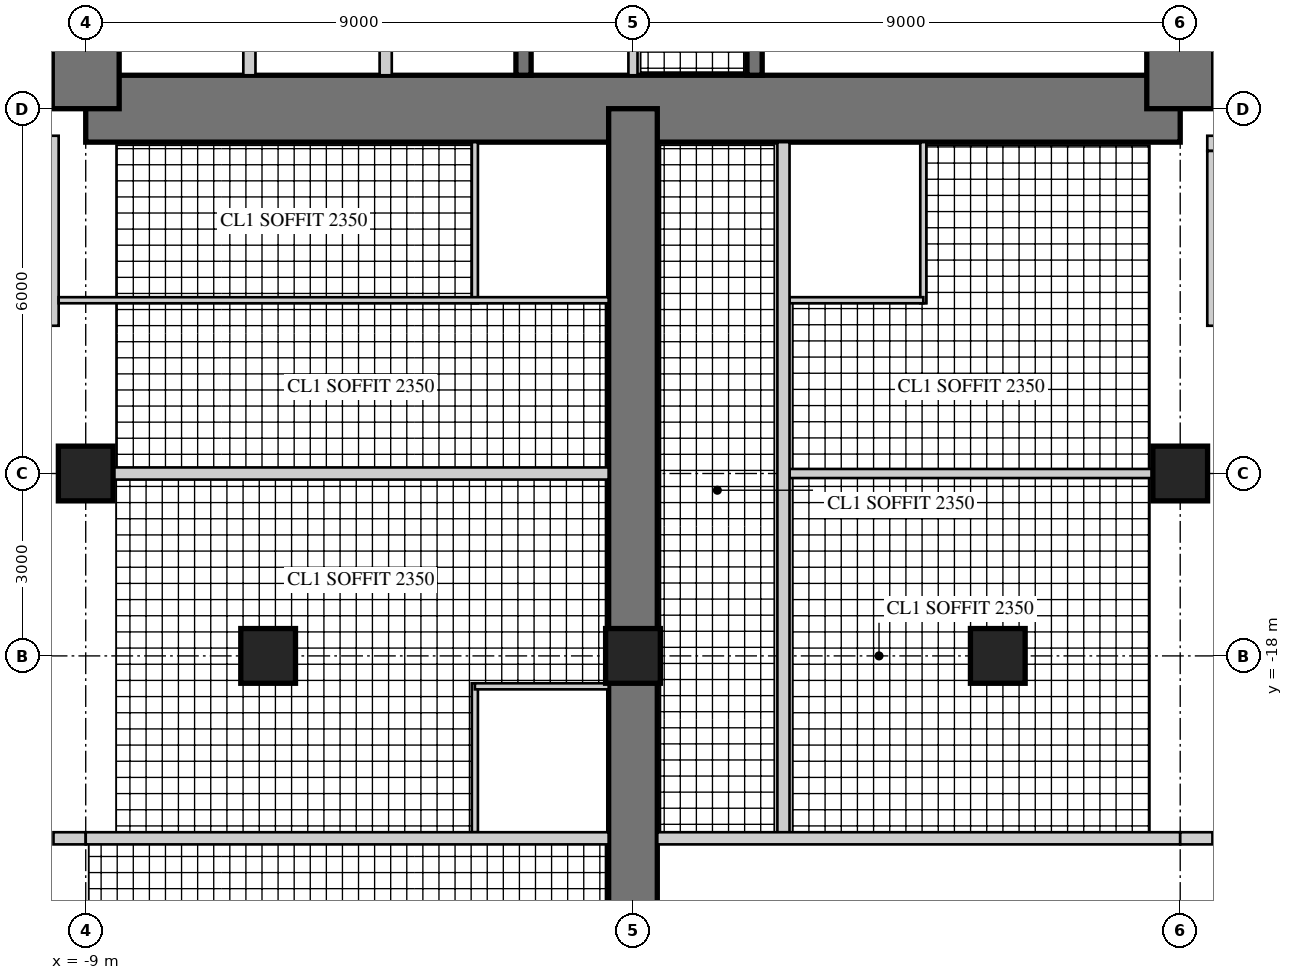
"""IFC4 building model, lengths in metres.
Left out: names, types, materials, properties, quantities, classifications, styles, units other than length and angle.
Written with IfcOpenShell. Run it as: python <this file> out.ifc"""

import sys

from ifc_helpers import new_model, si_unit, direction, frame, frame_2d, origin, origin_2d, place, context, subcontext, project, spatial, rectangle, hollow_rectangle, extrude, element, fill, save


model = new_model("IFC4")
c1 = context("Model", 3, precision=1e-05, world=origin(), true_north=direction((0.0, 1.0)))
c2 = subcontext(c1, "Body", "Model", "MODEL_VIEW")
j1 = project(units=[si_unit("LENGTHUNIT", "METRE"), si_unit("PLANEANGLEUNIT", "RADIAN")], contexts=[c1])
p1 = place(None, origin())
s1 = spatial("IfcSite", under=j1, at=p1, CompositionType="ELEMENT")
p2 = place(p1, origin())
s2 = spatial("IfcBuilding", under=s1, at=p2, CompositionType="ELEMENT")
p3 = place(p2, frame((0.0, 0.0, 179.7)))
s3 = spatial("IfcBuildingStorey", under=s2, at=p3, CompositionType="ELEMENT", Elevation=179.7)
p4 = place(p3, frame((-9.0, -9.0, 0.0), z_axis=(0.0, 0.0, 1.0), x_axis=(1.0, 0.0, 0.0)))
e1 = element("IfcWall", 1, at=p4, inside=s3, PredefinedType="SHEAR", context=c2, shape_type="SweptSolid", body=[
    extrude(rectangle(XDim=18.0, YDim=1.1, at=frame_2d((9.0, 0.0))), origin(), (0.0, 0.0, 1.0), 3.4),
])
p5 = place(p4, frame((9.8, 0.0, 0.0)))
e2 = element("IfcOpeningElement", 2, at=p5, cuts=e1, PredefinedType="OPENING", context=c2, shape_type="SweptSolid", body=[
    extrude(rectangle(XDim=1.0, YDim=2.4, at=frame_2d((0.5, 1.2))), frame((0.0, 0.56, 0.0), z_axis=(0.0, -1.0, 0.0), x_axis=(1.0, 0.0, 0.0)), (0.0, 0.0, 1.0), 1.12),
])
p6 = place(p3, frame((9.0, -9.0, 0.0), z_axis=(0.0, 0.0, 1.0), x_axis=(0.0, 1.0, 0.0)))
e3 = element("IfcWall", 3, at=p6, inside=s3, PredefinedType="SHEAR", context=c2, shape_type="SweptSolid", body=[
    extrude(rectangle(XDim=18.0, YDim=1.1, at=frame_2d((9.0, 0.0))), origin(), (0.0, 0.0, 1.0), 3.4),
])
p7 = place(p6, frame((9.8, 0.0, 0.0)))
e4 = element("IfcOpeningElement", 4, at=p7, cuts=e3, PredefinedType="OPENING", context=c2, shape_type="SweptSolid", body=[
    extrude(rectangle(XDim=1.0, YDim=2.4, at=frame_2d((0.5, 1.2))), frame((0.0, 0.56, 0.0), z_axis=(0.0, -1.0, 0.0), x_axis=(1.0, 0.0, 0.0)), (0.0, 0.0, 1.0), 1.12),
])
p8 = place(p3, frame((-9.0, 9.0, 0.0), z_axis=(0.0, 0.0, 1.0), x_axis=(0.0, -1.0, 0.0)))
e5 = element("IfcWall", 5, at=p8, inside=s3, PredefinedType="SHEAR", context=c2, shape_type="SweptSolid", body=[
    extrude(rectangle(XDim=18.0, YDim=1.1, at=frame_2d((9.0, 0.0))), origin(), (0.0, 0.0, 1.0), 3.4),
])
p9 = place(p8, frame((9.8, 0.0, 0.0)))
e6 = element("IfcOpeningElement", 6, at=p9, cuts=e5, PredefinedType="OPENING", context=c2, shape_type="SweptSolid", body=[
    extrude(rectangle(XDim=1.0, YDim=2.4, at=frame_2d((0.5, 1.2))), frame((0.0, 0.56, 0.0), z_axis=(0.0, -1.0, 0.0), x_axis=(1.0, 0.0, 0.0)), (0.0, 0.0, 1.0), 1.12),
])
p10 = place(p3, frame((-1.8, -1.875, 0.0), z_axis=(0.0, 0.0, 1.0), x_axis=(0.0, -1.0, 0.0)))
e7 = element("IfcWall", 7, at=p10, inside=s3, PredefinedType="SHEAR", context=c2, shape_type="SweptSolid", body=[
    extrude(rectangle(XDim=6.575, YDim=0.25, at=frame_2d((3.288, 0.0))), origin(), (0.0, 0.0, 1.0), 3.4),
])
p11 = place(p10, frame((1.875, 0.0, 0.0)))
e8 = element("IfcOpeningElement", 8, at=p11, cuts=e7, PredefinedType="OPENING", context=c2, shape_type="SweptSolid", body=[
    extrude(rectangle(XDim=1.6, YDim=2.4, at=frame_2d((0.8, 1.2))), frame((0.0, 0.135, 0.0), z_axis=(0.0, -1.0, 0.0), x_axis=(1.0, 0.0, 0.0)), (0.0, 0.0, 1.0), 0.27),
])
for number, where, z_axis, x_axis in (
    (9, (-4.067, -5.975, 0.0), (0.0, 0.0, 1.0), (0.0, -1.0, 0.0)),
    (10, (-6.308, -5.975, 0.0), (0.0, 0.0, 1.0), (0.0, -1.0, 0.0)),
):
    element("IfcWall", number, at=place(p3, frame(where, z_axis=z_axis, x_axis=x_axis)), inside=s3, PredefinedType="PARTITIONING", context=c2, shape_type="SweptSolid", body=[
        extrude(rectangle(XDim=2.475, YDim=0.2, at=frame_2d((1.237, 0.0))), origin(), (0.0, 0.0, 1.0), 3.4),
    ])
p12 = place(p3, frame((2.0, -1.675, 0.0), z_axis=(0.0, 0.0, 1.0), x_axis=(0.0, -1.0, 0.0)))
e11 = element("IfcWall", 11, at=p12, inside=s3, PredefinedType="SHEAR", context=c2, shape_type="SweptSolid", body=[
    extrude(rectangle(XDim=6.775, YDim=0.25, at=frame_2d((3.387, 0.0))), origin(), (0.0, 0.0, 1.0), 3.4),
])
p13 = place(p12, frame((0.725, 0.0, 0.0)))
e12 = element("IfcOpeningElement", 12, at=p13, cuts=e11, PredefinedType="OPENING", context=c2, shape_type="SweptSolid", body=[
    extrude(rectangle(XDim=1.0, YDim=2.1, at=frame_2d((0.5, 1.05))), frame((0.0, 0.135, 0.0), z_axis=(0.0, -1.0, 0.0), x_axis=(1.0, 0.0, 0.0)), (0.0, 0.0, 1.0), 0.27),
])
p14 = place(p3, frame((0.0, -9.0, 0.0), z_axis=(0.0, 0.0, 1.0), x_axis=(0.0, -1.0, 0.0)))
e13 = element("IfcWall", 13, at=p14, inside=s3, PredefinedType="SHEAR", context=c2, shape_type="SweptSolid", body=[
    extrude(rectangle(XDim=18.0, YDim=0.8, at=frame_2d((9.0, 0.0))), origin(), (0.0, 0.0, 1.0), 3.4),
])
p15 = place(p14, frame((3.95, 0.0, 0.0)))
e14 = element("IfcOpeningElement", 14, at=p15, cuts=e13, PredefinedType="OPENING", context=c2, shape_type="SweptSolid", body=[
    extrude(rectangle(XDim=1.0, YDim=2.15, at=frame_2d((0.5, 1.075))), frame((0.0, 0.41, 0.0), z_axis=(0.0, -1.0, 0.0), x_axis=(1.0, 0.0, 0.0)), (0.0, 0.0, 1.0), 0.82),
])
p16 = place(p14, frame((6.6, 0.0, 0.0)))
e15 = element("IfcOpeningElement", 15, at=p16, cuts=e13, PredefinedType="OPENING", context=c2, shape_type="SweptSolid", body=[
    extrude(rectangle(XDim=1.0, YDim=2.15, at=frame_2d((0.5, 1.075))), frame((0.0, 0.41, 0.0), z_axis=(0.0, -1.0, 0.0), x_axis=(1.0, 0.0, 0.0)), (0.0, 0.0, 1.0), 0.82),
])
p17 = place(p14, frame((13.25, 0.0, 0.0)))
e16 = element("IfcOpeningElement", 16, at=p17, cuts=e13, PredefinedType="OPENING", context=c2, shape_type="SweptSolid", body=[
    extrude(rectangle(XDim=1.0, YDim=2.2, at=frame_2d((0.5, 1.1))), frame((0.0, 0.41, 0.0), z_axis=(0.0, -1.0, 0.0), x_axis=(1.0, 0.0, 0.0)), (0.0, 0.0, 1.0), 0.82),
])
for number, where, z_axis, x_axis in (
    (17, (-9.0, -15.0, 0.0), (0.0, 0.0, 1.0), (1.0, 0.0, 0.0)),
    (18, (9.0, -15.0, 0.0), (0.0, 0.0, 1.0), (1.0, 0.0, 0.0)),
    (19, (-6.0, -18.0, 0.0), (0.0, 0.0, 1.0), (1.0, 0.0, 0.0)),
    (20, (0.0, -18.0, 0.0), (0.0, 0.0, 1.0), (1.0, 0.0, 0.0)),
    (21, (6.0, -18.0, 0.0), (0.0, 0.0, 1.0), (1.0, 0.0, 0.0)),
):
    element("IfcColumn", number, at=place(p3, frame(where, z_axis=z_axis, x_axis=x_axis)), inside=s3, PredefinedType="COLUMN", context=c2, shape_type="SweptSolid", body=[
        extrude(rectangle(XDim=0.9, YDim=0.9, at=origin_2d()), origin(), (0.0, 0.0, 1.0), 3.4),
    ])
p18 = place(p3, frame((9.445, -9.57, 0.0), z_axis=(0.0, 0.0, 1.0), x_axis=(1.0, 0.0, 0.0)))
e22 = element("IfcWall", 22, at=p18, inside=s3, PredefinedType="SOLIDWALL", context=c2, shape_type="SweptSolid", body=[
    extrude(rectangle(XDim=3.125, YDim=0.25, at=frame_2d((1.562, 0.0))), origin(), (0.0, 0.0, 1.0), 3.22),
])
p19 = place(p18, frame((0.6, 0.0, 0.0)))
e23 = element("IfcOpeningElement", 23, at=p19, cuts=e22, PredefinedType="OPENING", context=c2, shape_type="SweptSolid", body=[
    extrude(rectangle(XDim=1.0, YDim=2.2, at=frame_2d((0.5, 1.1))), frame((0.0, 0.135, 0.0), z_axis=(0.0, -1.0, 0.0), x_axis=(1.0, 0.0, 0.0)), (0.0, 0.0, 1.0), 0.27),
])
p20 = place(p3, frame((-9.57, -9.445, 0.0), z_axis=(0.0, 0.0, 1.0), x_axis=(0.0, -1.0, 0.0)))
e24 = element("IfcWall", 24, at=p20, inside=s3, PredefinedType="SOLIDWALL", context=c2, shape_type="SweptSolid", body=[
    extrude(rectangle(XDim=3.125, YDim=0.25, at=frame_2d((1.562, 0.0))), origin(), (0.0, 0.0, 1.0), 3.22),
])
p21 = place(p20, frame((0.6, 0.0, 0.0)))
e25 = element("IfcOpeningElement", 25, at=p21, cuts=e24, PredefinedType="OPENING", context=c2, shape_type="SweptSolid", body=[
    extrude(rectangle(XDim=1.0, YDim=2.2, at=frame_2d((0.5, 1.1))), frame((0.0, 0.135, 0.0), z_axis=(0.0, -1.0, 0.0), x_axis=(1.0, 0.0, 0.0)), (0.0, 0.0, 1.0), 0.27),
])
p22 = place(p3, frame((9.57, -12.57, 0.0), z_axis=(0.0, 0.0, 1.0), x_axis=(0.0, 1.0, 0.0)))
e26 = element("IfcWall", 26, at=p22, inside=s3, PredefinedType="SOLIDWALL", context=c2, shape_type="SweptSolid", body=[
    extrude(rectangle(XDim=2.875, YDim=0.25, at=frame_2d((1.438, 0.0))), origin(), (0.0, 0.0, 1.0), 3.22),
])
p23 = place(p22, frame((0.6, 0.0, 0.0)))
e27 = element("IfcOpeningElement", 27, at=p23, cuts=e26, PredefinedType="OPENING", context=c2, shape_type="SweptSolid", body=[
    extrude(rectangle(XDim=1.0, YDim=2.2, at=frame_2d((0.5, 1.1))), frame((0.0, 0.135, 0.0), z_axis=(0.0, -1.0, 0.0), x_axis=(1.0, 0.0, 0.0)), (0.0, 0.0, 1.0), 0.27),
])
p24 = place(p3, frame((0.0, -5.675, 0.0), z_axis=(0.0, 0.0, 1.0), x_axis=(0.0, -1.0, 0.0)))
e28 = element("IfcWall", 28, at=p24, inside=s3, PredefinedType="PARTITIONING", context=c2, shape_type="SweptSolid", body=[
    extrude(rectangle(XDim=2.775, YDim=0.15, at=frame_2d((1.387, 0.0))), origin(), (0.0, 0.0, 1.0), 3.22),
])
p25 = place(p24, frame((0.4, 0.0, 0.0)))
e29 = element("IfcOpeningElement", 29, at=p25, cuts=e28, PredefinedType="OPENING", context=c2, shape_type="SweptSolid", body=[
    extrude(rectangle(XDim=1.0, YDim=2.1, at=frame_2d((0.5, 1.05))), frame((0.0, 0.085, 0.0), z_axis=(0.0, -1.0, 0.0), x_axis=(1.0, 0.0, 0.0)), (0.0, 0.0, 1.0), 0.17),
])
p26 = place(p3, frame((4.775, -9.55, 0.0), z_axis=(0.0, 0.0, 1.0), x_axis=(0.0, -1.0, 0.0)))
e30 = element("IfcWall", 30, at=p26, inside=s3, PredefinedType="PARTITIONING", context=c2, shape_type="SweptSolid", body=[
    extrude(rectangle(XDim=2.65, YDim=0.1, at=frame_2d((1.325, 0.0))), origin(), (0.0, 0.0, 1.0), 3.22),
])
p27 = place(p3, frame((2.575, -12.15, 0.0), z_axis=(0.0, 0.0, 1.0), x_axis=(1.0, 0.0, 0.0)))
e31 = element("IfcWall", 31, at=p27, inside=s3, PredefinedType="PARTITIONING", context=c2, shape_type="SweptSolid", body=[
    extrude(rectangle(XDim=2.2, YDim=0.1, at=frame_2d((1.1, 0.0))), origin(), (0.0, 0.0, 1.0), 3.22),
])
p28 = place(p27, frame((0.55, 0.0, 0.0)))
e32 = element("IfcOpeningElement", 32, at=p28, cuts=e31, PredefinedType="OPENING", context=c2, shape_type="SweptSolid", body=[
    extrude(rectangle(XDim=0.9, YDim=2.1, at=frame_2d((0.45, 1.05))), frame((0.0, 0.06, 0.0), z_axis=(0.0, -1.0, 0.0), x_axis=(1.0, 0.0, 0.0)), (0.0, 0.0, 1.0), 0.12),
])
p29 = place(p3, frame((2.575, -15.0, 0.0), z_axis=(0.0, 0.0, 1.0), x_axis=(1.0, 0.0, 0.0)))
e33 = element("IfcWall", 33, at=p29, inside=s3, PredefinedType="PARTITIONING", context=c2, shape_type="SweptSolid", body=[
    extrude(rectangle(XDim=5.975, YDim=0.15, at=frame_2d((2.988, 0.0))), origin(), (0.0, 0.0, 1.0), 2.47),
])
p30 = place(p29, frame((0.5, 0.0, 0.0)))
e34 = element("IfcOpeningElement", 34, at=p30, cuts=e33, PredefinedType="OPENING", context=c2, shape_type="SweptSolid", body=[
    extrude(rectangle(XDim=1.0, YDim=2.1, at=frame_2d((0.5, 1.05))), frame((0.0, 0.085, 0.0), z_axis=(0.0, -1.0, 0.0), x_axis=(1.0, 0.0, 0.0)), (0.0, 0.0, 1.0), 0.17),
])
p31 = place(p3, frame((-2.6, -9.55, 0.0), z_axis=(0.0, 0.0, 1.0), x_axis=(0.0, -1.0, 0.0)))
e35 = element("IfcWall", 35, at=p31, inside=s3, PredefinedType="PARTITIONING", context=c2, shape_type="SweptSolid", body=[
    extrude(rectangle(XDim=2.65, YDim=0.1, at=frame_2d((1.325, 0.0))), origin(), (0.0, 0.0, 1.0), 3.22),
])
p32 = place(p3, frame((-9.445, -12.15, 0.0), z_axis=(0.0, 0.0, 1.0), x_axis=(1.0, 0.0, 0.0)))
e36 = element("IfcWall", 36, at=p32, inside=s3, PredefinedType="PARTITIONING", context=c2, shape_type="SweptSolid", body=[
    extrude(rectangle(XDim=9.045, YDim=0.1, at=frame_2d((4.522, 0.0))), origin(), (0.0, 0.0, 1.0), 3.22),
])
p33 = place(p32, frame((5.495, 0.0, 0.0)))
e37 = element("IfcOpeningElement", 37, at=p33, cuts=e36, PredefinedType="OPENING", context=c2, shape_type="SweptSolid", body=[
    extrude(rectangle(XDim=0.9, YDim=2.1, at=frame_2d((0.45, 1.05))), frame((0.0, 0.06, 0.0), z_axis=(0.0, -1.0, 0.0), x_axis=(1.0, 0.0, 0.0)), (0.0, 0.0, 1.0), 0.12),
])
p34 = place(p32, frame((7.595, 0.0, 0.0)))
e38 = element("IfcOpeningElement", 38, at=p34, cuts=e36, PredefinedType="OPENING", context=c2, shape_type="SweptSolid", body=[
    extrude(rectangle(XDim=0.9, YDim=2.1, at=frame_2d((0.45, 1.05))), frame((0.0, 0.06, 0.0), z_axis=(0.0, -1.0, 0.0), x_axis=(1.0, 0.0, 0.0)), (0.0, 0.0, 1.0), 0.12),
])
p35 = place(p3, frame((-8.55, -15.0, 0.0), z_axis=(0.0, 0.0, 1.0), x_axis=(1.0, 0.0, 0.0)))
e39 = element("IfcWall", 39, at=p35, inside=s3, PredefinedType="SOLIDWALL", context=c2, shape_type="SweptSolid", body=[
    extrude(rectangle(XDim=8.15, YDim=0.2, at=frame_2d((4.075, 0.0))), origin(), (0.0, 0.0, 1.0), 2.47),
])
p36 = place(p3, frame((-2.6, -18.45, 0.0), z_axis=(0.0, 0.0, 1.0), x_axis=(0.0, -1.0, 0.0)))
e40 = element("IfcWall", 40, at=p36, inside=s3, PredefinedType="PARTITIONING", context=c2, shape_type="SweptSolid", body=[
    extrude(rectangle(XDim=2.45, YDim=0.1, at=frame_2d((1.225, 0.0))), origin(), (0.0, 0.0, 1.0), 3.22),
])
p37 = place(p3, frame((-2.6, -18.5, 0.0), z_axis=(0.0, 0.0, 1.0), x_axis=(1.0, 0.0, 0.0)))
e41 = element("IfcWall", 41, at=p37, inside=s3, PredefinedType="PARTITIONING", context=c2, shape_type="SweptSolid", body=[
    extrude(rectangle(XDim=2.2, YDim=0.1, at=frame_2d((1.1, 0.0))), origin(), (0.0, 0.0, 1.0), 3.22),
])
p38 = place(p37, frame((0.55, 0.0, 0.0)))
e42 = element("IfcOpeningElement", 42, at=p38, cuts=e41, PredefinedType="OPENING", context=c2, shape_type="SweptSolid", body=[
    extrude(rectangle(XDim=0.9, YDim=2.1, at=frame_2d((0.45, 1.05))), frame((0.0, 0.06, 0.0), z_axis=(0.0, -1.0, 0.0), x_axis=(1.0, 0.0, 0.0)), (0.0, 0.0, 1.0), 0.12),
])
p39 = place(p3, frame((2.475, -9.55, 0.0), z_axis=(0.0, 0.0, 1.0), x_axis=(0.0, -1.0, 0.0)))
e43 = element("IfcWall", 43, at=p39, inside=s3, PredefinedType="SOLIDWALL", context=c2, shape_type="SweptSolid", body=[
    extrude(rectangle(XDim=11.45, YDim=0.2, at=frame_2d((5.725, 0.0))), origin(), (0.0, 0.0, 1.0), 3.22),
])
p40 = place(p39, frame((3.4, 0.0, 0.0)))
e44 = element("IfcOpeningElement", 44, at=p40, cuts=e43, PredefinedType="OPENING", context=c2, shape_type="SweptSolid", body=[
    extrude(rectangle(XDim=1.0, YDim=2.15, at=frame_2d((0.5, 1.075))), frame((0.0, 0.11, 0.0), z_axis=(0.0, -1.0, 0.0), x_axis=(1.0, 0.0, 0.0)), (0.0, 0.0, 1.0), 0.22),
])
p41 = place(p3, frame((-9.53, -21.0, 0.0), z_axis=(0.0, 0.0, 1.0), x_axis=(1.0, 0.0, 0.0)))
e45 = element("IfcWall", 45, at=p41, inside=s3, PredefinedType="SOLIDWALL", context=c2, shape_type="SweptSolid", body=[
    extrude(rectangle(XDim=0.53, YDim=0.2, at=frame_2d((0.265, 0.0))), origin(), (0.0, 0.0, 1.0), 3.22),
])
p42 = place(p3, frame((-9.0, -21.0, 0.0), z_axis=(0.0, 0.0, 1.0), x_axis=(1.0, 0.0, 0.0)))
e46 = element("IfcWall", 46, at=p42, inside=s3, PredefinedType="SOLIDWALL", context=c2, shape_type="SweptSolid", body=[
    extrude(rectangle(XDim=8.6, YDim=0.2, at=frame_2d((4.3, 0.0))), origin(), (0.0, 0.0, 1.0), 2.62),
])
p43 = place(p3, frame((0.4, -21.0, 0.0), z_axis=(0.0, 0.0, 1.0), x_axis=(1.0, 0.0, 0.0)))
e47 = element("IfcWall", 47, at=p43, inside=s3, PredefinedType="SOLIDWALL", context=c2, shape_type="SweptSolid", body=[
    extrude(rectangle(XDim=8.6, YDim=0.2, at=frame_2d((4.3, 0.0))), origin(), (0.0, 0.0, 1.0), 2.62),
])
p44 = place(p43, frame((0.4, 0.0, 0.0)))
e48 = element("IfcOpeningElement", 48, at=p44, cuts=e47, PredefinedType="OPENING", context=c2, shape_type="SweptSolid", body=[
    extrude(rectangle(XDim=1.0, YDim=2.2, at=frame_2d((0.5, 1.1))), frame((0.0, 0.11, 0.0), z_axis=(0.0, -1.0, 0.0), x_axis=(1.0, 0.0, 0.0)), (0.0, 0.0, 1.0), 0.22),
])
p45 = place(p3, frame((9.0, -21.0, 0.0), z_axis=(0.0, 0.0, 1.0), x_axis=(1.0, 0.0, 0.0)))
e49 = element("IfcWall", 49, at=p45, inside=s3, PredefinedType="SOLIDWALL", context=c2, shape_type="SweptSolid", body=[
    extrude(rectangle(XDim=0.53, YDim=0.2, at=frame_2d((0.265, 0.0))), origin(), (0.0, 0.0, 1.0), 3.22),
])
p46 = place(p21, origin())
e50 = element("IfcDoor", 50, at=p46, inside=s3, OperationType="SINGLE_SWING_LEFT", PredefinedType="DOOR", context=c2, shape_type="SweptSolid", body=[
    extrude(hollow_rectangle(XDim=1.0, YDim=2.2, WallThickness=0.06, at=frame_2d((0.5, 1.1))), frame((0.0, 0.025, 0.0), z_axis=(0.0, -1.0, 0.0), x_axis=(1.0, 0.0, 0.0)), (0.0, 0.0, 1.0), 0.05),
    extrude(rectangle(XDim=0.879, YDim=2.079, at=frame_2d((0.5, 1.1))), frame((0.0, 0.025, 0.0), z_axis=(0.0, -1.0, 0.0), x_axis=(1.0, 0.0, 0.0)), (0.0, 0.0, 1.0), 0.05),
])
fill(e25, e50)
p47 = place(p23, origin())
e51 = element("IfcDoor", 51, at=p47, inside=s3, OperationType="SINGLE_SWING_RIGHT", PredefinedType="DOOR", context=c2, shape_type="SweptSolid", body=[
    extrude(hollow_rectangle(XDim=1.0, YDim=2.2, WallThickness=0.06, at=frame_2d((0.5, 1.1))), frame((0.0, 0.025, 0.0), z_axis=(0.0, -1.0, 0.0), x_axis=(1.0, 0.0, 0.0)), (0.0, 0.0, 1.0), 0.05),
    extrude(rectangle(XDim=0.879, YDim=2.079, at=frame_2d((0.5, 1.1))), frame((0.0, 0.025, 0.0), z_axis=(0.0, -1.0, 0.0), x_axis=(1.0, 0.0, 0.0)), (0.0, 0.0, 1.0), 0.05),
])
fill(e27, e51)
p48 = place(p28, origin())
e52 = element("IfcDoor", 52, at=p48, inside=s3, OperationType="SINGLE_SWING_LEFT", PredefinedType="DOOR", context=c2, shape_type="SweptSolid", body=[
    extrude(rectangle(XDim=0.9, YDim=2.1, at=frame_2d((0.45, 1.05))), frame((0.0, 0.025, 0.0), z_axis=(0.0, -1.0, 0.0), x_axis=(1.0, 0.0, 0.0)), (0.0, 0.0, 1.0), 0.05),
])
fill(e32, e52)
p49 = place(p30, origin())
e53 = element("IfcDoor", 53, at=p49, inside=s3, OperationType="SINGLE_SWING_LEFT", PredefinedType="DOOR", context=c2, shape_type="SweptSolid", body=[
    extrude(rectangle(XDim=1.0, YDim=2.1, at=frame_2d((0.5, 1.05))), frame((0.0, 0.025, 0.0), z_axis=(0.0, -1.0, 0.0), x_axis=(1.0, 0.0, 0.0)), (0.0, 0.0, 1.0), 0.05),
])
fill(e34, e53)
p50 = place(p33, origin())
e54 = element("IfcDoor", 54, at=p50, inside=s3, OperationType="SINGLE_SWING_RIGHT", PredefinedType="DOOR", context=c2, shape_type="SweptSolid", body=[
    extrude(rectangle(XDim=0.9, YDim=2.1, at=frame_2d((0.45, 1.05))), frame((0.0, 0.025, 0.0), z_axis=(0.0, -1.0, 0.0), x_axis=(1.0, 0.0, 0.0)), (0.0, 0.0, 1.0), 0.05),
])
fill(e37, e54)
p51 = place(p34, origin())
e55 = element("IfcDoor", 55, at=p51, inside=s3, OperationType="SINGLE_SWING_RIGHT", PredefinedType="DOOR", context=c2, shape_type="SweptSolid", body=[
    extrude(rectangle(XDim=0.9, YDim=2.1, at=frame_2d((0.45, 1.05))), frame((0.0, 0.025, 0.0), z_axis=(0.0, -1.0, 0.0), x_axis=(1.0, 0.0, 0.0)), (0.0, 0.0, 1.0), 0.05),
])
fill(e38, e55)
p52 = place(p38, frame((0.9, 0.0, 0.0), z_axis=(0.0, 0.0, 1.0), x_axis=(-1.0, 0.0, 0.0)))
e56 = element("IfcDoor", 56, at=p52, inside=s3, OperationType="SINGLE_SWING_RIGHT", PredefinedType="DOOR", context=c2, shape_type="SweptSolid", body=[
    extrude(rectangle(XDim=0.9, YDim=2.1, at=frame_2d((0.45, 1.05))), frame((0.0, 0.025, 0.0), z_axis=(0.0, -1.0, 0.0), x_axis=(1.0, 0.0, 0.0)), (0.0, 0.0, 1.0), 0.05),
])
fill(e42, e56)
p53 = place(p40, origin())
e57 = element("IfcDoor", 57, at=p53, inside=s3, OperationType="SINGLE_SWING_LEFT", PredefinedType="DOOR", context=c2, shape_type="SweptSolid", body=[
    extrude(rectangle(XDim=1.0, YDim=2.15, at=frame_2d((0.5, 1.075))), frame((0.0, 0.025, 0.0), z_axis=(0.0, -1.0, 0.0), x_axis=(1.0, 0.0, 0.0)), (0.0, 0.0, 1.0), 0.05),
])
fill(e44, e57)
p54 = place(p44, frame((1.0, 0.0, 0.0), z_axis=(0.0, 0.0, 1.0), x_axis=(-1.0, 0.0, 0.0)))
e58 = element("IfcDoor", 58, at=p54, inside=s3, OperationType="SINGLE_SWING_RIGHT", PredefinedType="DOOR", context=c2, shape_type="SweptSolid", body=[
    extrude(rectangle(XDim=1.0, YDim=2.2, at=frame_2d((0.5, 1.1))), frame((0.0, 0.025, 0.0), z_axis=(0.0, -1.0, 0.0), x_axis=(1.0, 0.0, 0.0)), (0.0, 0.0, 1.0), 0.05),
])
fill(e48, e58)
p55 = place(p15, frame((1.0, 0.0, 0.0), z_axis=(0.0, 0.0, 1.0), x_axis=(-1.0, 0.0, 0.0)))
e59 = element("IfcDoor", 59, at=p55, inside=s3, OperationType="SINGLE_SWING_RIGHT", PredefinedType="DOOR", context=c2, shape_type="SweptSolid", body=[
    extrude(rectangle(XDim=1.0, YDim=2.15, at=frame_2d((0.5, 1.075))), frame((0.0, 0.025, 0.0), z_axis=(0.0, -1.0, 0.0), x_axis=(1.0, 0.0, 0.0)), (0.0, 0.0, 1.0), 0.05),
])
fill(e14, e59)
p56 = place(p16, frame((1.0, 0.0, 0.0), z_axis=(0.0, 0.0, 1.0), x_axis=(-1.0, 0.0, 0.0)))
e60 = element("IfcDoor", 60, at=p56, inside=s3, OperationType="SINGLE_SWING_RIGHT", PredefinedType="DOOR", context=c2, shape_type="SweptSolid", body=[
    extrude(rectangle(XDim=1.0, YDim=2.15, at=frame_2d((0.5, 1.075))), frame((0.0, 0.025, 0.0), z_axis=(0.0, -1.0, 0.0), x_axis=(1.0, 0.0, 0.0)), (0.0, 0.0, 1.0), 0.05),
])
fill(e15, e60)
p57 = place(p5, origin())
e61 = element("IfcDoor", 61, at=p57, inside=s3, OperationType="SINGLE_SWING_RIGHT", PredefinedType="DOOR", context=c2, shape_type="SweptSolid", body=[
    extrude(rectangle(XDim=1.0, YDim=2.4, at=frame_2d((0.5, 1.2))), frame((0.0, 0.055, 0.0), z_axis=(0.0, -1.0, 0.0), x_axis=(1.0, 0.0, 0.0)), (0.0, 0.0, 1.0), 0.05),
])
fill(e2, e61)
save(model, sys.argv[1])
